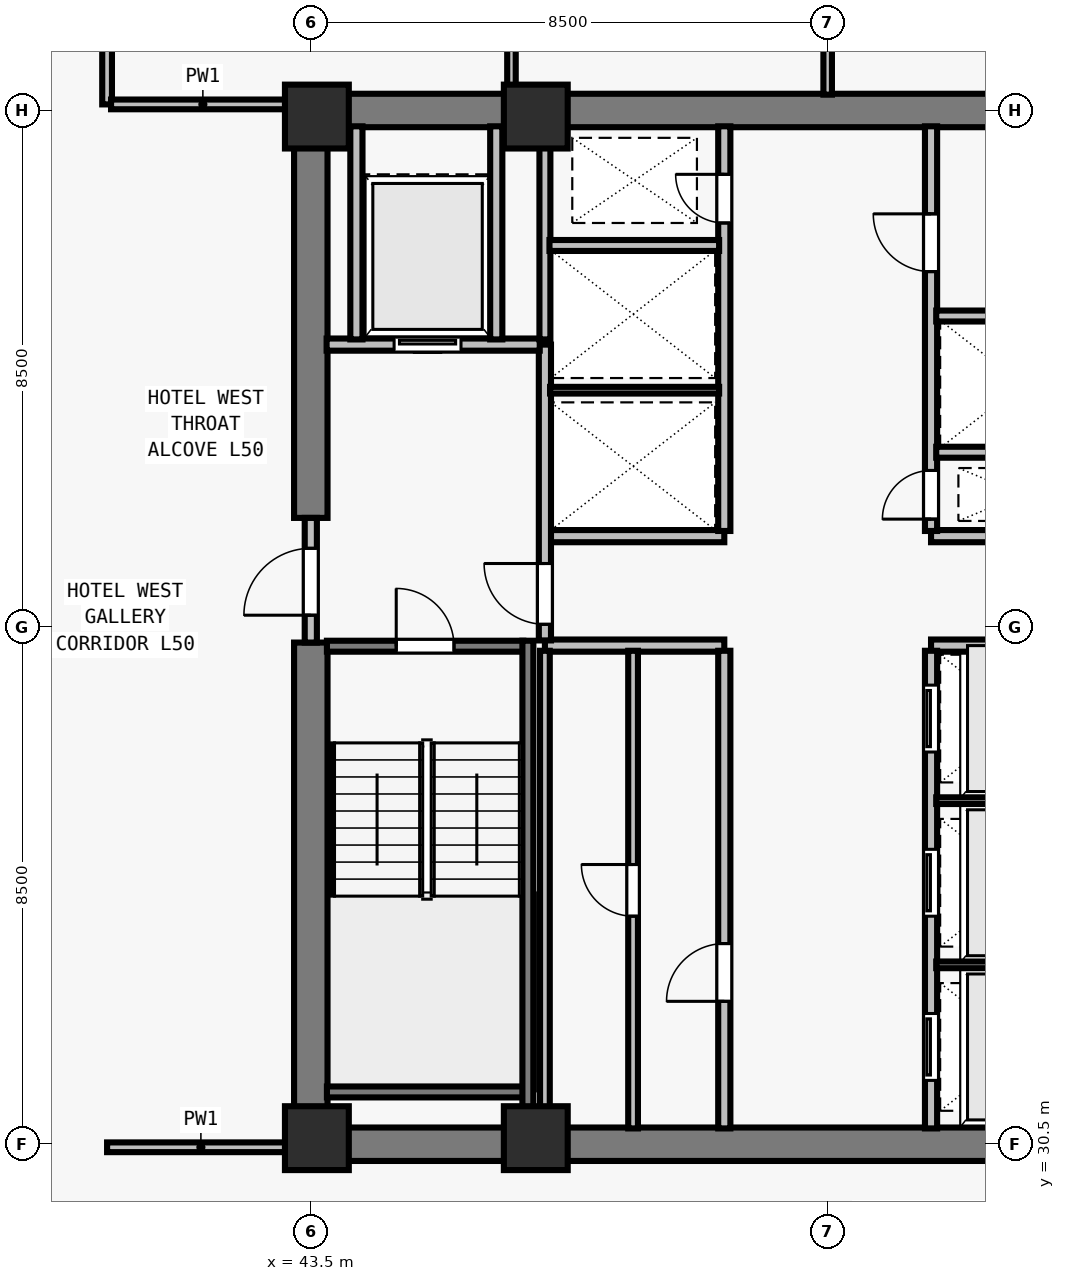
"""IFC4 building model, lengths in metres.
Left out: names, types, materials, properties, quantities, classifications, styles, units other than length and angle.
Written with IfcOpenShell. Run it as: python <this file> out.ifc"""

import sys

from ifc_helpers import new_model, si_unit, direction, frame, frame_2d, origin, origin_2d, place, context, subcontext, project, spatial, rectangle, extrude, element, fill, save


model = new_model("IFC4")
c1 = context("Model", 3, precision=1e-05, world=origin(), true_north=direction((0.0, 1.0)))
c2 = subcontext(c1, "Body", "Model", "MODEL_VIEW")
j1 = project(units=[si_unit("LENGTHUNIT", "METRE"), si_unit("PLANEANGLEUNIT", "RADIAN")], contexts=[c1])
p1 = place(None, origin())
s1 = spatial("IfcSite", under=j1, at=p1, CompositionType="ELEMENT")
p2 = place(p1, origin())
s2 = spatial("IfcBuilding", under=s1, at=p2, CompositionType="ELEMENT")
p3 = place(p2, frame((0.0, 0.0, 183.0)))
s3 = spatial("IfcBuildingStorey", under=s2, at=p3, CompositionType="ELEMENT", Elevation=183.0)
for number, where, z_axis, x_axis in (
    (1, (43.6, 30.6, 0.0), (0.0, 0.0, 1.0), (1.0, 0.0, 0.0)),
    (2, (47.2, 30.6, 0.0), (0.0, 0.0, 1.0), (1.0, 0.0, 0.0)),
    (3, (43.6, 47.4, 0.0), (0.0, 0.0, 1.0), (1.0, 0.0, 0.0)),
    (4, (47.2, 47.4, 0.0), (0.0, 0.0, 1.0), (1.0, 0.0, 0.0)),
):
    element("IfcColumn", number, at=place(p3, frame(where, z_axis=z_axis, x_axis=x_axis)), inside=s3, PredefinedType="COLUMN", context=c2, shape_type="SweptSolid", body=[
        extrude(rectangle(XDim=1.05, YDim=1.05, at=origin_2d()), origin(), (0.0, 0.0, 1.0), 3.5),
    ])
for number, where, z_axis, x_axis in (
    (5, (43.225, 30.5, 0.0), (0.0, 0.0, 1.0), (1.0, 0.0, 0.0)),
    (6, (43.225, 47.5, 0.0), (0.0, 0.0, 1.0), (1.0, 0.0, 0.0)),
):
    element("IfcWall", number, at=place(p3, frame(where, z_axis=z_axis, x_axis=x_axis)), inside=s3, PredefinedType="SHEAR", context=c2, shape_type="SweptSolid", body=[
        extrude(rectangle(XDim=17.55, YDim=0.55, at=frame_2d((8.775, 0.0))), origin(), (0.0, 0.0, 1.0), 3.28),
    ])
p4 = place(p3, frame((43.5, 30.765, 0.0), z_axis=(0.0, 0.0, 1.0), x_axis=(0.0, 1.0, 0.0)))
e7 = element("IfcWall", 7, at=p4, inside=s3, PredefinedType="SHEAR", context=c2, shape_type="SweptSolid", body=[
    extrude(rectangle(XDim=7.985, YDim=0.55, at=frame_2d((3.993, 0.0))), origin(), (0.0, 0.0, 1.0), 3.28),
])
p5 = place(p3, frame((43.5, 40.8, 0.0), z_axis=(0.0, 0.0, 1.0), x_axis=(0.0, 1.0, 0.0)))
e8 = element("IfcWall", 8, at=p5, inside=s3, PredefinedType="SHEAR", context=c2, shape_type="SweptSolid", body=[
    extrude(rectangle(XDim=6.435, YDim=0.55, at=frame_2d((3.218, 0.0))), origin(), (0.0, 0.0, 1.0), 3.28),
])
for number, where, z_axis, x_axis in (
    (9, (47.35, 38.7, 0.0), (0.0, 0.0, 1.0), (1.0, 0.0, 0.0)),
    (10, (47.35, 40.5, 0.0), (0.0, 0.0, 1.0), (1.0, 0.0, 0.0)),
    (11, (53.7, 38.7, 0.0), (0.0, 0.0, 1.0), (1.0, 0.0, 0.0)),
    (12, (53.7, 40.5, 0.0), (0.0, 0.0, 1.0), (1.0, 0.0, 0.0)),
):
    element("IfcWall", number, at=place(p3, frame(where, z_axis=z_axis, x_axis=x_axis)), inside=s3, PredefinedType="SOLIDWALL", context=c2, shape_type="SweptSolid", body=[
        extrude(rectangle(XDim=2.95, YDim=0.2, at=frame_2d((1.475, 0.0))), origin(), (0.0, 0.0, 1.0), 3.28),
    ])
p6 = place(p3, frame((50.3, 30.76, 0.0), z_axis=(0.0, 0.0, 1.0), x_axis=(0.0, 1.0, 0.0)))
e13 = element("IfcWall", 13, at=p6, inside=s3, PredefinedType="SOLIDWALL", context=c2, shape_type="SweptSolid", body=[
    extrude(rectangle(XDim=7.855, YDim=0.2, at=frame_2d((3.927, 0.0))), origin(), (0.0, 0.0, 1.0), 3.28),
])
p7 = place(p6, frame((2.09, 0.0, 0.0)))
e14 = element("IfcOpeningElement", 14, at=p7, cuts=e13, PredefinedType="OPENING", context=c2, shape_type="SweptSolid", body=[
    extrude(rectangle(XDim=0.95, YDim=2.12, at=frame_2d((0.475, 1.06))), frame((0.0, 0.11, 0.0), z_axis=(0.0, -1.0, 0.0), x_axis=(1.0, 0.0, 0.0)), (0.0, 0.0, 1.0), 0.22),
])
p8 = place(p3, frame((53.7, 30.76, 0.0), z_axis=(0.0, 0.0, 1.0), x_axis=(0.0, 1.0, 0.0)))
e15 = element("IfcWall", 15, at=p8, inside=s3, PredefinedType="SOLIDWALL", context=c2, shape_type="SweptSolid", body=[
    extrude(rectangle(XDim=7.855, YDim=0.2, at=frame_2d((3.927, 0.0))), origin(), (0.0, 0.0, 1.0), 3.28),
])
p9 = place(p8, frame((0.79, 0.0, 0.0)))
e16 = element("IfcOpeningElement", 16, at=p9, cuts=e15, PredefinedType="OPENING", context=c2, shape_type="SweptSolid", body=[
    extrude(rectangle(XDim=1.1, YDim=2.2, at=frame_2d((0.55, 1.1))), frame((0.0, 0.11, 0.0), z_axis=(0.0, -1.0, 0.0), x_axis=(1.0, 0.0, 0.0)), (0.0, 0.0, 1.0), 0.22),
])
p10 = place(p8, frame((3.49, 0.0, 0.0)))
e17 = element("IfcOpeningElement", 17, at=p10, cuts=e15, PredefinedType="OPENING", context=c2, shape_type="SweptSolid", body=[
    extrude(rectangle(XDim=1.1, YDim=2.2, at=frame_2d((0.55, 1.1))), frame((0.0, 0.11, 0.0), z_axis=(0.0, -1.0, 0.0), x_axis=(1.0, 0.0, 0.0)), (0.0, 0.0, 1.0), 0.22),
])
p11 = place(p8, frame((6.19, 0.0, 0.0)))
e18 = element("IfcOpeningElement", 18, at=p11, cuts=e15, PredefinedType="OPENING", context=c2, shape_type="SweptSolid", body=[
    extrude(rectangle(XDim=1.1, YDim=2.2, at=frame_2d((0.55, 1.1))), frame((0.0, 0.11, 0.0), z_axis=(0.0, -1.0, 0.0), x_axis=(1.0, 0.0, 0.0)), (0.0, 0.0, 1.0), 0.22),
])
p12 = place(p3, frame((50.3, 40.585, 0.0), z_axis=(0.0, 0.0, 1.0), x_axis=(0.0, 1.0, 0.0)))
e19 = element("IfcWall", 19, at=p12, inside=s3, PredefinedType="SOLIDWALL", context=c2, shape_type="SweptSolid", body=[
    extrude(rectangle(XDim=6.655, YDim=0.2, at=frame_2d((3.328, 0.0))), origin(), (0.0, 0.0, 1.0), 3.28),
])
p13 = place(p12, frame((5.065, 0.0, 0.0)))
e20 = element("IfcOpeningElement", 20, at=p13, cuts=e19, PredefinedType="OPENING", context=c2, shape_type="SweptSolid", body=[
    extrude(rectangle(XDim=0.8, YDim=2.08, at=frame_2d((0.4, 1.04))), frame((0.0, 0.11, 0.0), z_axis=(0.0, -1.0, 0.0), x_axis=(1.0, 0.0, 0.0)), (0.0, 0.0, 1.0), 0.22),
])
p14 = place(p3, frame((53.7, 40.585, 0.0), z_axis=(0.0, 0.0, 1.0), x_axis=(0.0, 1.0, 0.0)))
e21 = element("IfcWall", 21, at=p14, inside=s3, PredefinedType="SOLIDWALL", context=c2, shape_type="SweptSolid", body=[
    extrude(rectangle(XDim=6.655, YDim=0.2, at=frame_2d((3.328, 0.0))), origin(), (0.0, 0.0, 1.0), 3.28),
])
p15 = place(p14, frame((0.195, 0.0, 0.0)))
e22 = element("IfcOpeningElement", 22, at=p15, cuts=e21, PredefinedType="OPENING", context=c2, shape_type="SweptSolid", body=[
    extrude(rectangle(XDim=0.8, YDim=2.08, at=frame_2d((0.4, 1.04))), frame((0.0, 0.11, 0.0), z_axis=(0.0, -1.0, 0.0), x_axis=(1.0, 0.0, 0.0)), (0.0, 0.0, 1.0), 0.22),
])
p16 = place(p14, frame((4.265, 0.0, 0.0)))
e23 = element("IfcOpeningElement", 23, at=p16, cuts=e21, PredefinedType="OPENING", context=c2, shape_type="SweptSolid", body=[
    extrude(rectangle(XDim=0.95, YDim=2.12, at=frame_2d((0.475, 1.06))), frame((0.0, 0.11, 0.0), z_axis=(0.0, -1.0, 0.0), x_axis=(1.0, 0.0, 0.0)), (0.0, 0.0, 1.0), 0.22),
])
p17 = place(p3, frame((43.5, 38.75, 0.0), z_axis=(0.0, 0.0, 1.0), x_axis=(0.0, 1.0, 0.0)))
e24 = element("IfcWall", 24, at=p17, inside=s3, PredefinedType="SOLIDWALL", context=c2, shape_type="SweptSolid", body=[
    extrude(rectangle(XDim=2.05, YDim=0.2, at=frame_2d((1.025, 0.0))), origin(), (0.0, 0.0, 1.0), 3.28),
])
p18 = place(p17, frame((0.45, 0.0, 0.0)))
e25 = element("IfcOpeningElement", 25, at=p18, cuts=e24, PredefinedType="OPENING", context=c2, shape_type="SweptSolid", body=[
    extrude(rectangle(XDim=1.1, YDim=2.15, at=frame_2d((0.55, 1.075))), frame((0.0, 0.11, 0.0), z_axis=(0.0, -1.0, 0.0), x_axis=(1.0, 0.0, 0.0)), (0.0, 0.0, 1.0), 0.22),
])
p19 = place(p3, frame((47.35, 38.785, 0.0), z_axis=(0.0, 0.0, 1.0), x_axis=(0.0, 1.0, 0.0)))
e26 = element("IfcWall", 26, at=p19, inside=s3, PredefinedType="SOLIDWALL", context=c2, shape_type="SweptSolid", body=[
    extrude(rectangle(XDim=4.865, YDim=0.2, at=frame_2d((2.433, 0.0))), origin(), (0.0, 0.0, 1.0), 3.28),
])
p20 = place(p19, frame((0.265, 0.0, 0.0)))
e27 = element("IfcOpeningElement", 27, at=p20, cuts=e26, PredefinedType="OPENING", context=c2, shape_type="SweptSolid", body=[
    extrude(rectangle(XDim=1.0, YDim=2.15, at=frame_2d((0.5, 1.075))), frame((0.0, 0.11, 0.0), z_axis=(0.0, -1.0, 0.0), x_axis=(1.0, 0.0, 0.0)), (0.0, 0.0, 1.0), 0.22),
])
p21 = place(p3, frame((43.76, 43.65, 0.0), z_axis=(0.0, 0.0, 1.0), x_axis=(1.0, 0.0, 0.0)))
e28 = element("IfcWall", 28, at=p21, inside=s3, PredefinedType="SOLIDWALL", context=c2, shape_type="SweptSolid", body=[
    extrude(rectangle(XDim=3.505, YDim=0.2, at=frame_2d((1.752, 0.0))), origin(), (0.0, 0.0, 1.0), 3.28),
])
p22 = place(p21, frame((1.11, 0.0, 0.0)))
e29 = element("IfcOpeningElement", 29, at=p22, cuts=e28, PredefinedType="OPENING", context=c2, shape_type="SweptSolid", body=[
    extrude(rectangle(XDim=1.1, YDim=2.2, at=frame_2d((0.55, 1.1))), frame((0.0, 0.11, 0.0), z_axis=(0.0, -1.0, 0.0), x_axis=(1.0, 0.0, 0.0)), (0.0, 0.0, 1.0), 0.22),
])
for number, where, z_axis, x_axis in (
    (30, (46.55, 43.735, 0.0), (0.0, 0.0, 1.0), (0.0, 1.0, 0.0)),
    (31, (44.25, 43.735, 0.0), (0.0, 0.0, 1.0), (0.0, 1.0, 0.0)),
):
    element("IfcWall", number, at=place(p3, frame(where, z_axis=z_axis, x_axis=x_axis)), inside=s3, PredefinedType="SOLIDWALL", context=c2, shape_type="SweptSolid", body=[
        extrude(rectangle(XDim=3.505, YDim=0.2, at=frame_2d((1.752, 0.0))), origin(), (0.0, 0.0, 1.0), 3.28),
    ])
p23 = place(p3, frame((47.35, 30.76, 0.0), z_axis=(0.0, 0.0, 1.0), x_axis=(0.0, 1.0, 0.0)))
e32 = element("IfcWall", 32, at=p23, inside=s3, PredefinedType="PARTITIONING", context=c2, shape_type="SweptSolid", body=[
    extrude(rectangle(XDim=7.855, YDim=0.16, at=frame_2d((3.927, 0.0))), origin(), (0.0, 0.0, 1.0), 3.28),
])
p24 = place(p3, frame((48.8, 30.76, 0.0), z_axis=(0.0, 0.0, 1.0), x_axis=(0.0, 1.0, 0.0)))
e33 = element("IfcWall", 33, at=p24, inside=s3, PredefinedType="PARTITIONING", context=c2, shape_type="SweptSolid", body=[
    extrude(rectangle(XDim=7.855, YDim=0.16, at=frame_2d((3.927, 0.0))), origin(), (0.0, 0.0, 1.0), 3.28),
])
p25 = place(p24, frame((3.49, 0.0, 0.0)))
e34 = element("IfcOpeningElement", 34, at=p25, cuts=e33, PredefinedType="OPENING", context=c2, shape_type="SweptSolid", body=[
    extrude(rectangle(XDim=0.85, YDim=2.12, at=frame_2d((0.425, 1.06))), frame((0.0, 0.09, 0.0), z_axis=(0.0, -1.0, 0.0), x_axis=(1.0, 0.0, 0.0)), (0.0, 0.0, 1.0), 0.18),
])
for number, where, z_axis, x_axis in (
    (35, (53.785, 33.45, 0.0), (0.0, 0.0, 1.0), (1.0, 0.0, 0.0)),
    (36, (53.785, 36.15, 0.0), (0.0, 0.0, 1.0), (1.0, 0.0, 0.0)),
):
    element("IfcWall", number, at=place(p3, frame(where, z_axis=z_axis, x_axis=x_axis)), inside=s3, PredefinedType="PARTITIONING", context=c2, shape_type="SweptSolid", body=[
        extrude(rectangle(XDim=2.79, YDim=0.11, at=frame_2d((1.395, 0.0))), origin(), (0.0, 0.0, 1.0), 3.28),
    ])
p26 = place(p3, frame((47.35, 43.735, 0.0), z_axis=(0.0, 0.0, 1.0), x_axis=(0.0, 1.0, 0.0)))
e37 = element("IfcWall", 37, at=p26, inside=s3, PredefinedType="SOLIDWALL", context=c2, shape_type="SweptSolid", body=[
    extrude(rectangle(XDim=3.505, YDim=0.18, at=frame_2d((1.752, 0.0))), origin(), (0.0, 0.0, 1.0), 3.28),
])
p27 = place(p3, frame((47.435, 42.9, 0.0), z_axis=(0.0, 0.0, 1.0), x_axis=(1.0, 0.0, 0.0)))
e38 = element("IfcWall", 38, at=p27, inside=s3, PredefinedType="PARTITIONING", context=c2, shape_type="SweptSolid", body=[
    extrude(rectangle(XDim=2.78, YDim=0.11, at=frame_2d((1.39, 0.0))), origin(), (0.0, 0.0, 1.0), 3.28),
])
p28 = place(p3, frame((47.425, 45.28, 0.0), z_axis=(0.0, 0.0, 1.0), x_axis=(1.0, 0.0, 0.0)))
e39 = element("IfcWall", 39, at=p28, inside=s3, PredefinedType="SOLIDWALL", context=c2, shape_type="SweptSolid", body=[
    extrude(rectangle(XDim=2.79, YDim=0.18, at=frame_2d((1.395, 0.0))), origin(), (0.0, 0.0, 1.0), 3.28),
])
p29 = place(p3, frame((53.785, 41.88, 0.0), z_axis=(0.0, 0.0, 1.0), x_axis=(1.0, 0.0, 0.0)))
e40 = element("IfcWall", 40, at=p29, inside=s3, PredefinedType="SOLIDWALL", context=c2, shape_type="SweptSolid", body=[
    extrude(rectangle(XDim=2.78, YDim=0.18, at=frame_2d((1.39, 0.0))), origin(), (0.0, 0.0, 1.0), 3.28),
])
p30 = place(p3, frame((53.785, 44.12, 0.0), z_axis=(0.0, 0.0, 1.0), x_axis=(1.0, 0.0, 0.0)))
e41 = element("IfcWall", 41, at=p30, inside=s3, PredefinedType="SOLIDWALL", context=c2, shape_type="SweptSolid", body=[
    extrude(rectangle(XDim=2.79, YDim=0.18, at=frame_2d((1.395, 0.0))), origin(), (0.0, 0.0, 1.0), 3.28),
])
p31 = place(p3, frame((40.15, 47.6, 0.0), z_axis=(0.0, 0.0, 1.0), x_axis=(0.0, 1.0, 0.0)))
e42 = element("IfcWall", 42, at=p31, inside=s3, PredefinedType="PARTITIONING", context=c2, shape_type="SweptSolid", body=[
    extrude(rectangle(XDim=15.075, YDim=0.16, at=frame_2d((7.538, 0.0))), origin(), (0.0, 0.0, 1.0), 2.555),
])
p32 = place(p31, frame((3.2, 0.0, 0.0)))
e43 = element("IfcOpeningElement", 43, at=p32, cuts=e42, PredefinedType="OPENING", context=c2, shape_type="SweptSolid", body=[
    extrude(rectangle(XDim=0.96, YDim=2.12, at=frame_2d((0.48, 1.06))), frame((0.0, 0.09, 0.0), z_axis=(0.0, -1.0, 0.0), x_axis=(1.0, 0.0, 0.0)), (0.0, 0.0, 1.0), 0.18),
])
p33 = place(p3, frame((40.15, 30.45, 0.0), z_axis=(0.0, 0.0, 1.0), x_axis=(1.0, 0.0, 0.0)))
e44 = element("IfcWall", 44, at=p33, inside=s3, PredefinedType="PARTITIONING", context=c2, shape_type="SweptSolid", body=[
    extrude(rectangle(XDim=3.085, YDim=0.16, at=frame_2d((1.542, 0.0))), origin(), (0.0, 0.0, 1.0), 3.28),
])
p34 = place(p3, frame((40.215, 47.6, 0.0), z_axis=(0.0, 0.0, 1.0), x_axis=(1.0, 0.0, 0.0)))
e45 = element("IfcWall", 45, at=p34, inside=s3, PredefinedType="PARTITIONING", context=c2, shape_type="SweptSolid", body=[
    extrude(rectangle(XDim=3.02, YDim=0.16, at=frame_2d((1.51, 0.0))), origin(), (0.0, 0.0, 1.0), 3.28),
])
p35 = place(p3, frame((46.8, 47.76, 0.0), z_axis=(0.0, 0.0, 1.0), x_axis=(0.0, 1.0, 0.0)))
e46 = element("IfcWall", 46, at=p35, inside=s3, PredefinedType="PARTITIONING", context=c2, shape_type="SweptSolid", body=[
    extrude(rectangle(XDim=14.915, YDim=0.14, at=frame_2d((7.458, 0.0))), origin(), (0.0, 0.0, 1.0), 3.28),
])
p36 = place(p35, frame((2.34, 0.0, 0.0)))
e47 = element("IfcOpeningElement", 47, at=p36, cuts=e46, PredefinedType="OPENING", context=c2, shape_type="SweptSolid", body=[
    extrude(rectangle(XDim=0.92, YDim=2.12, at=frame_2d((0.46, 1.06))), frame((0.0, 0.08, 0.0), z_axis=(0.0, -1.0, 0.0), x_axis=(1.0, 0.0, 0.0)), (0.0, 0.0, 1.0), 0.16),
])
p37 = place(p3, frame((52.0, 47.76, 0.0), z_axis=(0.0, 0.0, 1.0), x_axis=(0.0, 1.0, 0.0)))
e48 = element("IfcWall", 48, at=p37, inside=s3, PredefinedType="PARTITIONING", context=c2, shape_type="SweptSolid", body=[
    extrude(rectangle(XDim=14.915, YDim=0.14, at=frame_2d((7.458, 0.0))), origin(), (0.0, 0.0, 1.0), 2.896),
])
p38 = place(p37, frame((2.34, 0.0, 0.0)))
e49 = element("IfcOpeningElement", 49, at=p38, cuts=e48, PredefinedType="OPENING", context=c2, shape_type="SweptSolid", body=[
    extrude(rectangle(XDim=0.92, YDim=2.12, at=frame_2d((0.46, 1.06))), frame((0.0, 0.08, 0.0), z_axis=(0.0, -1.0, 0.0), x_axis=(1.0, 0.0, 0.0)), (0.0, 0.0, 1.0), 0.16),
])
p39 = place(p3, frame((43.765, 38.69, 0.0), z_axis=(0.0, 0.0, 1.0), x_axis=(1.0, 0.0, 0.0)))
e50 = element("IfcWall", 50, at=p39, inside=s3, PredefinedType="SOLIDWALL", context=c2, shape_type="SweptSolid", body=[
    extrude(rectangle(XDim=3.23, YDim=0.18, at=frame_2d((1.615, 0.0))), origin(), (0.0, 0.0, 1.0), 3.28),
])
p40 = place(p39, frame((1.14, 0.0, 0.0)))
e51 = element("IfcOpeningElement", 51, at=p40, cuts=e50, PredefinedType="OPENING", context=c2, shape_type="SweptSolid", body=[
    extrude(rectangle(XDim=0.95, YDim=2.15, at=frame_2d((0.475, 1.075))), frame((0.0, 0.1, 0.0), z_axis=(0.0, -1.0, 0.0), x_axis=(1.0, 0.0, 0.0)), (0.0, 0.0, 1.0), 0.2),
])
p41 = place(p3, frame((43.765, 31.36, 0.0), z_axis=(0.0, 0.0, 1.0), x_axis=(1.0, 0.0, 0.0)))
e52 = element("IfcWall", 52, at=p41, inside=s3, PredefinedType="SOLIDWALL", context=c2, shape_type="SweptSolid", body=[
    extrude(rectangle(XDim=3.23, YDim=0.18, at=frame_2d((1.615, 0.0))), origin(), (0.0, 0.0, 1.0), 3.28),
])
p42 = place(p3, frame((47.07, 38.78, 0.0), z_axis=(0.0, 0.0, 1.0), x_axis=(0.0, -1.0, 0.0)))
e53 = element("IfcWall", 53, at=p42, inside=s3, PredefinedType="SOLIDWALL", context=c2, shape_type="SweptSolid", body=[
    extrude(rectangle(XDim=8.017, YDim=0.18, at=frame_2d((4.009, 0.0))), origin(), (0.0, 0.0, 1.0), 3.28),
])
p43 = place(p18, origin())
e54 = element("IfcDoor", 54, at=p43, inside=s3, OperationType="SINGLE_SWING_LEFT", PredefinedType="DOOR", context=c2, shape_type="SweptSolid", body=[
    extrude(rectangle(XDim=1.1, YDim=2.15, at=frame_2d((0.55, 1.075))), frame((0.0, 0.025, 0.0), z_axis=(0.0, -1.0, 0.0), x_axis=(1.0, 0.0, 0.0)), (0.0, 0.0, 1.0), 0.05),
])
fill(e25, e54)
p44 = place(p20, origin())
e55 = element("IfcDoor", 55, at=p44, inside=s3, OperationType="SINGLE_SWING_RIGHT", PredefinedType="DOOR", context=c2, shape_type="SweptSolid", body=[
    extrude(rectangle(XDim=1.0, YDim=2.15, at=frame_2d((0.5, 1.075))), frame((0.0, 0.025, 0.0), z_axis=(0.0, -1.0, 0.0), x_axis=(1.0, 0.0, 0.0)), (0.0, 0.0, 1.0), 0.05),
])
fill(e27, e55)
p45 = place(p22, origin())
e56 = element("IfcDoor", 56, at=p45, inside=s3, OperationType="SLIDING_TO_LEFT", PredefinedType="DOOR", context=c2, shape_type="SweptSolid", body=[
    extrude(rectangle(XDim=1.1, YDim=2.2, at=frame_2d((0.55, 1.1))), frame((0.0, 0.025, 0.0), z_axis=(0.0, -1.0, 0.0), x_axis=(1.0, 0.0, 0.0)), (0.0, 0.0, 1.0), 0.05),
])
fill(e29, e56)
p46 = place(p7, origin())
e57 = element("IfcDoor", 57, at=p46, inside=s3, OperationType="SINGLE_SWING_LEFT", PredefinedType="DOOR", context=c2, shape_type="SweptSolid", body=[
    extrude(rectangle(XDim=0.95, YDim=2.12, at=frame_2d((0.475, 1.06))), frame((0.0, 0.025, 0.0), z_axis=(0.0, -1.0, 0.0), x_axis=(1.0, 0.0, 0.0)), (0.0, 0.0, 1.0), 0.05),
])
fill(e14, e57)
p47 = place(p25, origin())
e58 = element("IfcDoor", 58, at=p47, inside=s3, OperationType="SINGLE_SWING_RIGHT", PredefinedType="DOOR", context=c2, shape_type="SweptSolid", body=[
    extrude(rectangle(XDim=0.85, YDim=2.12, at=frame_2d((0.425, 1.06))), frame((0.0, 0.025, 0.0), z_axis=(0.0, -1.0, 0.0), x_axis=(1.0, 0.0, 0.0)), (0.0, 0.0, 1.0), 0.05),
])
fill(e34, e58)
p48 = place(p9, origin())
e59 = element("IfcDoor", 59, at=p48, inside=s3, OperationType="SLIDING_TO_LEFT", PredefinedType="DOOR", context=c2, shape_type="SweptSolid", body=[
    extrude(rectangle(XDim=1.1, YDim=2.2, at=frame_2d((0.55, 1.1))), frame((0.0, 0.025, 0.0), z_axis=(0.0, -1.0, 0.0), x_axis=(1.0, 0.0, 0.0)), (0.0, 0.0, 1.0), 0.05),
])
fill(e16, e59)
p49 = place(p10, origin())
e60 = element("IfcDoor", 60, at=p49, inside=s3, OperationType="SLIDING_TO_LEFT", PredefinedType="DOOR", context=c2, shape_type="SweptSolid", body=[
    extrude(rectangle(XDim=1.1, YDim=2.2, at=frame_2d((0.55, 1.1))), frame((0.0, 0.025, 0.0), z_axis=(0.0, -1.0, 0.0), x_axis=(1.0, 0.0, 0.0)), (0.0, 0.0, 1.0), 0.05),
])
fill(e17, e60)
p50 = place(p11, origin())
e61 = element("IfcDoor", 61, at=p50, inside=s3, OperationType="SLIDING_TO_LEFT", PredefinedType="DOOR", context=c2, shape_type="SweptSolid", body=[
    extrude(rectangle(XDim=1.1, YDim=2.2, at=frame_2d((0.55, 1.1))), frame((0.0, 0.025, 0.0), z_axis=(0.0, -1.0, 0.0), x_axis=(1.0, 0.0, 0.0)), (0.0, 0.0, 1.0), 0.05),
])
fill(e18, e61)
p51 = place(p13, origin())
e62 = element("IfcDoor", 62, at=p51, inside=s3, OperationType="SINGLE_SWING_RIGHT", PredefinedType="DOOR", context=c2, shape_type="SweptSolid", body=[
    extrude(rectangle(XDim=0.8, YDim=2.08, at=frame_2d((0.4, 1.04))), frame((0.0, 0.025, 0.0), z_axis=(0.0, -1.0, 0.0), x_axis=(1.0, 0.0, 0.0)), (0.0, 0.0, 1.0), 0.05),
])
fill(e20, e62)
p52 = place(p15, origin())
e63 = element("IfcDoor", 63, at=p52, inside=s3, OperationType="SINGLE_SWING_LEFT", PredefinedType="DOOR", context=c2, shape_type="SweptSolid", body=[
    extrude(rectangle(XDim=0.8, YDim=2.08, at=frame_2d((0.4, 1.04))), frame((0.0, 0.025, 0.0), z_axis=(0.0, -1.0, 0.0), x_axis=(1.0, 0.0, 0.0)), (0.0, 0.0, 1.0), 0.05),
])
fill(e22, e63)
p53 = place(p16, origin())
e64 = element("IfcDoor", 64, at=p53, inside=s3, OperationType="SINGLE_SWING_RIGHT", PredefinedType="DOOR", context=c2, shape_type="SweptSolid", body=[
    extrude(rectangle(XDim=0.95, YDim=2.12, at=frame_2d((0.475, 1.06))), frame((0.0, 0.025, 0.0), z_axis=(0.0, -1.0, 0.0), x_axis=(1.0, 0.0, 0.0)), (0.0, 0.0, 1.0), 0.05),
])
fill(e23, e64)
p54 = place(p40, origin())
e65 = element("IfcDoor", 65, at=p54, inside=s3, OperationType="SINGLE_SWING_LEFT", PredefinedType="DOOR", context=c2, shape_type="SweptSolid", body=[
    extrude(rectangle(XDim=0.95, YDim=2.15, at=frame_2d((0.475, 1.075))), frame((0.0, 0.025, 0.0), z_axis=(0.0, -1.0, 0.0), x_axis=(1.0, 0.0, 0.0)), (0.0, 0.0, 1.0), 0.05),
])
fill(e51, e65)
save(model, sys.argv[1])
